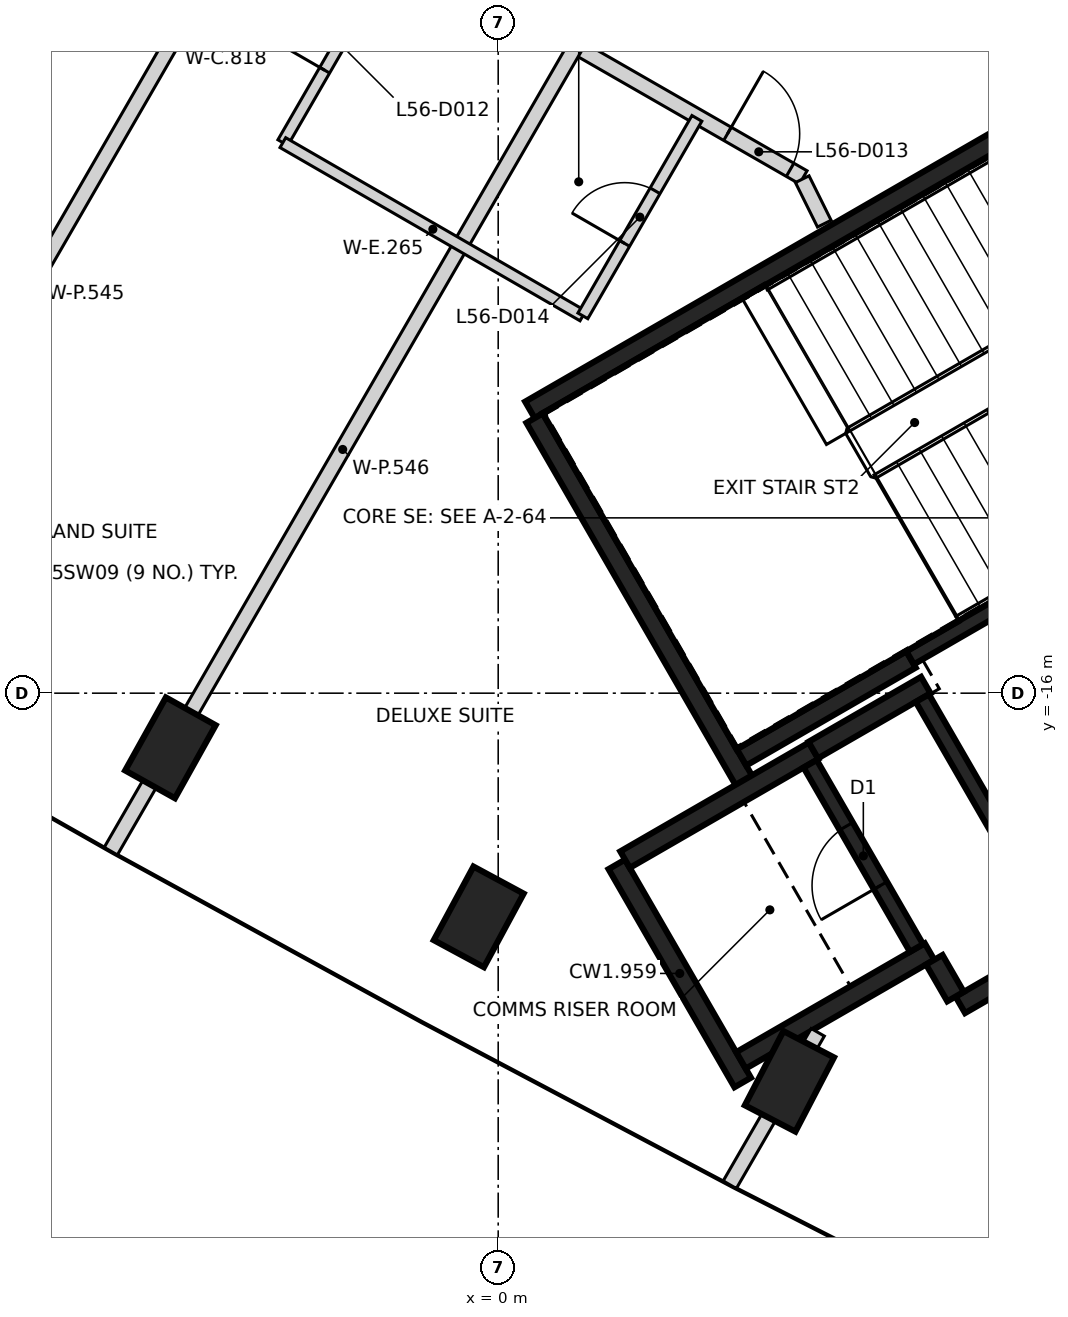
"""IFC4 building model, lengths in metres.
Left out: names, types, materials, properties, quantities, classifications, styles, units other than length and angle.
Written with IfcOpenShell. Run it as: python <this file> out.ifc"""

import sys

from ifc_helpers import new_model, si_unit, direction, frame, frame_2d, origin, origin_2d, place, context, subcontext, project, spatial, rectangle, extrude, element, fill, save


model = new_model("IFC4")
c1 = context("Model", 3, precision=1e-05, world=origin(), true_north=direction((0.0, 1.0)))
c2 = subcontext(c1, "Body", "Model", "MODEL_VIEW")
j1 = project(units=[si_unit("LENGTHUNIT", "METRE"), si_unit("PLANEANGLEUNIT", "RADIAN")], contexts=[c1])
p1 = place(None, origin())
s1 = spatial("IfcSite", under=j1, at=p1, CompositionType="ELEMENT")
p2 = place(p1, origin())
s2 = spatial("IfcBuilding", under=s1, at=p2, CompositionType="ELEMENT")
p3 = place(p2, frame((0.0, 0.0, 225.0)))
s3 = spatial("IfcBuildingStorey", under=s2, at=p3, CompositionType="ELEMENT", Elevation=225.0)
for number, where, z_axis, x_axis in (
    (1, (-4.312, -16.719, -0.35), (0.0, 0.0, 1.0), (0.487, 0.873, 0.0)),
    (2, (-0.256, -18.943, -0.35), (0.0, 0.0, 1.0), (0.475, 0.88, 0.0)),
    (3, (3.832, -21.107, -0.35), (0.0, 0.0, 1.0), (0.461, 0.887, 0.0)),
):
    element("IfcColumn", number, at=place(p3, frame(where, z_axis=z_axis, x_axis=x_axis)), inside=s3, PredefinedType="COLUMN", context=c2, shape_type="SweptSolid", body=[
        extrude(rectangle(XDim=1.1, YDim=0.75, at=origin_2d()), origin(), (0.0, 0.0, 1.0), 3.6),
    ])
p4 = place(p3, frame((0.417, -12.273, 0.0), z_axis=(0.0, 0.0, 1.0), x_axis=(0.866021906294, 0.500006057782, 0.0)))
e4 = element("IfcWall", 4, at=p4, inside=s3, PredefinedType="SHEAR", context=c2, shape_type="SweptSolid", body=[
    extrude(rectangle(XDim=11.55, YDim=0.25, at=frame_2d((5.775, 0.0))), origin(), (0.0, 0.0, 1.0), 3.25),
])
p5 = place(p4, frame((10.025, 0.0, 0.0)))
e5 = element("IfcOpeningElement", 5, at=p5, cuts=e4, PredefinedType="OPENING", context=c2, shape_type="SweptSolid", body=[
    extrude(rectangle(XDim=1.2, YDim=2.1, at=frame_2d((0.6, 1.05))), frame((0.0, 0.135, 0.0), z_axis=(0.0, -1.0, 0.0), x_axis=(1.0, 0.0, 0.0)), (0.0, 0.0, 1.0), 0.27),
])
p6 = place(p4, frame((8.725, 0.0, 0.0)))
e6 = element("IfcOpeningElement", 6, at=p6, cuts=e4, PredefinedType="OPENING", context=c2, shape_type="SweptSolid", body=[
    extrude(rectangle(XDim=1.2, YDim=2.1, at=frame_2d((0.6, 1.05))), frame((0.0, 0.135, 0.0), z_axis=(0.0, -1.0, 0.0), x_axis=(1.0, 0.0, 0.0)), (0.0, 0.0, 1.0), 0.27),
])
p7 = place(p3, frame((3.235, -17.153, 0.0), z_axis=(0.0, 0.0, 1.0), x_axis=(-0.500008851346, 0.866020293397, 0.0)))
e7 = element("IfcWall", 7, at=p7, inside=s3, PredefinedType="SHEAR", context=c2, shape_type="SweptSolid", body=[
    extrude(rectangle(XDim=5.51, YDim=0.25, at=frame_2d((2.755, 0.0))), origin(), (0.0, 0.0, 1.0), 3.25),
])
p8 = place(p3, frame((3.217, -21.122, 0.0), z_axis=(0.0, 0.0, 1.0), x_axis=(-0.499998874531, 0.866026053573, 0.0)))
e8 = element("IfcWall", 8, at=p8, inside=s3, PredefinedType="SHEAR", context=c2, shape_type="SweptSolid", body=[
    extrude(rectangle(XDim=3.313, YDim=0.25, at=frame_2d((1.656, 0.0))), origin(), (0.0, 0.0, 1.0), 3.25),
])
p9 = place(p3, frame((1.669, -18.19, 0.0), z_axis=(0.0, 0.0, 1.0), x_axis=(0.866042235819, 0.499970844928, 0.0)))
e9 = element("IfcWall", 9, at=p9, inside=s3, PredefinedType="SHEAR", context=c2, shape_type="SweptSolid", body=[
    extrude(rectangle(XDim=2.865, YDim=0.25, at=frame_2d((1.432, 0.0))), origin(), (0.0, 0.0, 1.0), 3.25),
])
p10 = place(p3, frame((5.675, -19.399, 0.0), z_axis=(0.0, 0.0, 1.0), x_axis=(-0.866026637627, -0.499997862916, 0.0)))
e10 = element("IfcWall", 10, at=p10, inside=s3, PredefinedType="SHEAR", context=c2, shape_type="SweptSolid", body=[
    extrude(rectangle(XDim=2.865, YDim=0.25, at=frame_2d((1.432, 0.0))), origin(), (0.0, 0.0, 1.0), 3.25),
])
p11 = place(p3, frame((5.431, -15.556, 0.0), z_axis=(0.0, 0.0, 1.0), x_axis=(-0.866022940537, -0.500004266446, 0.0)))
e11 = element("IfcWall", 11, at=p11, inside=s3, PredefinedType="SHEAR", context=c2, shape_type="SweptSolid", body=[
    extrude(rectangle(XDim=2.575, YDim=0.25, at=frame_2d((1.287, 0.0))), origin(), (0.0, 0.0, 1.0), 3.25),
])
p12 = place(p3, frame((4.145, -16.749, 0.0), z_axis=(0.0, 0.0, 1.0), x_axis=(0.866038183914, 0.499977863513, 0.0)))
e12 = element("IfcWall", 12, at=p12, inside=s3, PredefinedType="SHEAR", context=c2, shape_type="SweptSolid", body=[
    extrude(rectangle(XDim=1.71, YDim=0.25, at=frame_2d((0.855, 0.0))), origin(), (0.0, 0.0, 1.0), 3.25),
])
p13 = place(p3, frame((7.452, -19.308, 0.0), z_axis=(0.0, 0.0, 1.0), x_axis=(-0.866044474677, -0.49996696679, 0.0)))
e13 = element("IfcWall", 13, at=p13, inside=s3, PredefinedType="SHEAR", context=c2, shape_type="SweptSolid", body=[
    extrude(rectangle(XDim=1.584, YDim=0.25, at=frame_2d((0.792, 0.0))), origin(), (0.0, 0.0, 1.0), 3.25),
])
p14 = place(p3, frame((6.017, -19.992, 0.0), z_axis=(0.0, 0.0, 1.0), x_axis=(-0.500364886717, 0.865814633822, 0.0)))
e14 = element("IfcWall", 14, at=p14, inside=s3, PredefinedType="SHEAR", context=c2, shape_type="SweptSolid", body=[
    extrude(rectangle(XDim=0.559, YDim=0.25, at=frame_2d((0.28, 0.0))), origin(), (0.0, 0.0, 1.0), 3.25),
])
p15 = place(p3, frame((5.419, -15.534, 0.0), z_axis=(0.0, 0.0, 1.0), x_axis=(0.866029065029, 0.499993658486, 0.0)))
e15 = element("IfcWall", 15, at=p15, inside=s3, PredefinedType="SHEAR", context=c2, shape_type="SweptSolid", body=[
    extrude(rectangle(XDim=5.974, YDim=0.2, at=frame_2d((2.987, 0.0))), origin(), (0.0, 0.0, 1.0), 3.25),
])
p16 = place(p3, frame((5.503, -19.352, 0.0), z_axis=(0.0, 0.0, 1.0), x_axis=(-0.499986818241, 0.866033014143, 0.0)))
e16 = element("IfcWall", 16, at=p16, inside=s3, PredefinedType="SHEAR", context=c2, shape_type="SweptSolid", body=[
    extrude(rectangle(XDim=2.798, YDim=0.2, at=frame_2d((1.399, 0.0))), origin(), (0.0, 0.0, 1.0), 3.25),
])
p17 = place(p16, frame((0.949, 0.0, 0.0)))
e17 = element("IfcOpeningElement", 17, at=p17, cuts=e16, PredefinedType="OPENING", context=c2, shape_type="SweptSolid", body=[
    extrude(rectangle(XDim=0.9, YDim=2.1, at=frame_2d((0.45, 1.05))), frame((0.0, 0.11, 0.0), z_axis=(0.0, -1.0, 0.0), x_axis=(1.0, 0.0, 0.0)), (0.0, 0.0, 1.0), 0.22),
])
p18 = place(p3, frame((6.96, -18.455, 0.0), z_axis=(0.0, 0.0, 1.0), x_axis=(-0.499926705758, 0.866067716099, 0.0)))
e18 = element("IfcWall", 18, at=p18, inside=s3, PredefinedType="SHEAR", context=c2, shape_type="SweptSolid", body=[
    extrude(rectangle(XDim=2.759, YDim=0.2, at=frame_2d((1.38, 0.0))), origin(), (0.0, 0.0, 1.0), 3.25),
])
p19 = place(p3, frame((-7.089, -2.836, 0.0), z_axis=(0.0, 0.0, 1.0), x_axis=(0.867106243364, -0.498123240493, 0.0)))
e19 = element("IfcWall", 19, at=p19, inside=s3, PredefinedType="PARTITIONING", context=c2, shape_type="SweptSolid", body=[
    extrude(rectangle(XDim=12.804, YDim=0.2, at=frame_2d((6.402, 0.0))), origin(), (0.0, 0.0, 1.0), 3.25),
])
p20 = place(p19, frame((1.909, 0.0, 0.0)))
e20 = element("IfcOpeningElement", 20, at=p20, cuts=e19, PredefinedType="OPENING", context=c2, shape_type="SweptSolid", body=[
    extrude(rectangle(XDim=1.0, YDim=2.1, at=frame_2d((0.5, 1.05))), frame((0.0, 0.11, 0.0), z_axis=(0.0, -1.0, 0.0), x_axis=(1.0, 0.0, 0.0)), (0.0, 0.0, 1.0), 0.22),
])
p21 = place(p19, frame((4.91, 0.0, 0.0)))
e21 = element("IfcOpeningElement", 21, at=p21, cuts=e19, PredefinedType="OPENING", context=c2, shape_type="SweptSolid", body=[
    extrude(rectangle(XDim=0.95, YDim=2.1, at=frame_2d((0.475, 1.05))), frame((0.0, 0.11, 0.0), z_axis=(0.0, -1.0, 0.0), x_axis=(1.0, 0.0, 0.0)), (0.0, 0.0, 1.0), 0.22),
])
p22 = place(p19, frame((11.654, 0.0, 0.0)))
e22 = element("IfcOpeningElement", 22, at=p22, cuts=e19, PredefinedType="OPENING", context=c2, shape_type="SweptSolid", body=[
    extrude(rectangle(XDim=0.95, YDim=2.1, at=frame_2d((0.475, 1.05))), frame((0.0, 0.11, 0.0), z_axis=(0.0, -1.0, 0.0), x_axis=(1.0, 0.0, 0.0)), (0.0, 0.0, 1.0), 0.22),
])
p23 = place(p3, frame((4.0, -9.238, 0.0), z_axis=(0.0, 0.0, 1.0), x_axis=(0.444370954227, -0.89584287408, 0.0)))
e23 = element("IfcWall", 23, at=p23, inside=s3, PredefinedType="PARTITIONING", context=c2, shape_type="SweptSolid", body=[
    extrude(rectangle(XDim=0.653, YDim=0.2, at=frame_2d((0.327, 0.0))), origin(), (0.0, 0.0, 1.0), 3.25),
])
p24 = place(p3, frame((-9.119, -15.795, 0.0), z_axis=(0.0, 0.0, 1.0), x_axis=(0.50001601051, 0.866016159915, 0.0)))
e24 = element("IfcWall", 24, at=p24, inside=s3, PredefinedType="PARTITIONING", context=c2, shape_type="SweptSolid", body=[
    extrude(rectangle(XDim=12.238, YDim=0.2, at=frame_2d((6.119, 0.0))), origin(), (0.0, 0.0, 1.0), 3.25),
])
p25 = place(p3, frame((-5.097, -18.078, 0.0), z_axis=(0.0, 0.0, 1.0), x_axis=(0.499960272111, 0.866048339477, 0.0)))
e25 = element("IfcWall", 25, at=p25, inside=s3, PredefinedType="PARTITIONING", context=c2, shape_type="SweptSolid", body=[
    extrude(rectangle(XDim=12.204, YDim=0.2, at=frame_2d((6.102, 0.0))), origin(), (0.0, 0.0, 1.0), 3.25),
])
p26 = place(p3, frame((3.047, -22.467, 0.0), z_axis=(0.0, 0.0, 1.0), x_axis=(0.50001757531, 0.866015256437, 0.0)))
e26 = element("IfcWall", 26, at=p26, inside=s3, PredefinedType="PARTITIONING", context=c2, shape_type="SweptSolid", body=[
    extrude(rectangle(XDim=2.315, YDim=0.2, at=frame_2d((1.158, 0.0))), origin(), (0.0, 0.0, 1.0), 3.25),
])
p27 = place(p3, frame((-2.833, -8.757, 0.0), z_axis=(0.0, 0.0, 1.0), x_axis=(0.499990139034, 0.866031096941, 0.0)))
e27 = element("IfcWall", 27, at=p27, inside=s3, PredefinedType="PARTITIONING", context=c2, shape_type="SweptSolid", body=[
    extrude(rectangle(XDim=3.0, YDim=0.15, at=frame_2d((1.5, 0.0))), origin(), (0.0, 0.0, 1.0), 3.25),
])
p28 = place(p27, frame((1.1, 0.0, 0.0)))
e28 = element("IfcOpeningElement", 28, at=p28, cuts=e27, PredefinedType="OPENING", context=c2, shape_type="SweptSolid", body=[
    extrude(rectangle(XDim=0.8, YDim=2.1, at=frame_2d((0.4, 1.05))), frame((0.0, 0.085, 0.0), z_axis=(0.0, -1.0, 0.0), x_axis=(1.0, 0.0, 0.0)), (0.0, 0.0, 1.0), 0.17),
])
p29 = place(p3, frame((-2.833, -8.757, 0.0), z_axis=(0.0, 0.0, 1.0), x_axis=(0.866002713795, -0.500039298155, 0.0)))
e29 = element("IfcWall", 29, at=p29, inside=s3, PredefinedType="PARTITIONING", context=c2, shape_type="SweptSolid", body=[
    extrude(rectangle(XDim=4.558, YDim=0.15, at=frame_2d((2.279, 0.0))), origin(), (0.0, 0.0, 1.0), 3.25),
])
p30 = place(p3, frame((1.114, -11.036, 0.0), z_axis=(0.0, 0.0, 1.0), x_axis=(0.50002537861, 0.866010750942, 0.0)))
e30 = element("IfcWall", 30, at=p30, inside=s3, PredefinedType="PARTITIONING", context=c2, shape_type="SweptSolid", body=[
    extrude(rectangle(XDim=3.0, YDim=0.15, at=frame_2d((1.5, 0.0))), origin(), (0.0, 0.0, 1.0), 3.25),
])
p31 = place(p30, frame((1.1, 0.0, 0.0)))
e31 = element("IfcOpeningElement", 31, at=p31, cuts=e30, PredefinedType="OPENING", context=c2, shape_type="SweptSolid", body=[
    extrude(rectangle(XDim=0.8, YDim=2.1, at=frame_2d((0.4, 1.05))), frame((0.0, 0.085, 0.0), z_axis=(0.0, -1.0, 0.0), x_axis=(1.0, 0.0, 0.0)), (0.0, 0.0, 1.0), 0.17),
])
p32 = place(p17, origin())
e32 = element("IfcDoor", 32, at=p32, inside=s3, OperationType="SINGLE_SWING_RIGHT", PredefinedType="DOOR", context=c2, shape_type="SweptSolid", body=[
    extrude(rectangle(XDim=0.9, YDim=2.1, at=frame_2d((0.45, 1.05))), frame((0.0, 0.025, 0.0), z_axis=(0.0, -1.0, 0.0), x_axis=(1.0, 0.0, 0.0)), (0.0, 0.0, 1.0), 0.05),
])
fill(e17, e32)
p33 = place(p28, frame((0.8, 0.0, 0.0), z_axis=(0.0, 0.0, 1.0), x_axis=(-1.0, 0.0, 0.0)))
e33 = element("IfcDoor", 33, at=p33, inside=s3, OperationType="SINGLE_SWING_LEFT", PredefinedType="DOOR", context=c2, shape_type="SweptSolid", body=[
    extrude(rectangle(XDim=0.8, YDim=2.1, at=frame_2d((0.4, 1.05))), frame((0.0, 0.025, 0.0), z_axis=(0.0, -1.0, 0.0), x_axis=(1.0, 0.0, 0.0)), (0.0, 0.0, 1.0), 0.05),
])
fill(e28, e33)
p34 = place(p22, frame((0.95, 0.0, 0.0), z_axis=(0.0, 0.0, 1.0), x_axis=(-1.0, 0.0, 0.0)))
e34 = element("IfcDoor", 34, at=p34, inside=s3, OperationType="SINGLE_SWING_LEFT", PredefinedType="DOOR", context=c2, shape_type="SweptSolid", body=[
    extrude(rectangle(XDim=0.95, YDim=2.1, at=frame_2d((0.475, 1.05))), frame((0.0, 0.025, 0.0), z_axis=(0.0, -1.0, 0.0), x_axis=(1.0, 0.0, 0.0)), (0.0, 0.0, 1.0), 0.05),
])
fill(e22, e34)
p35 = place(p31, origin())
e35 = element("IfcDoor", 35, at=p35, inside=s3, OperationType="SINGLE_SWING_LEFT", PredefinedType="DOOR", context=c2, shape_type="SweptSolid", body=[
    extrude(rectangle(XDim=0.8, YDim=2.1, at=frame_2d((0.4, 1.05))), frame((0.0, 0.025, 0.0), z_axis=(0.0, -1.0, 0.0), x_axis=(1.0, 0.0, 0.0)), (0.0, 0.0, 1.0), 0.05),
])
fill(e31, e35)
save(model, sys.argv[1])
